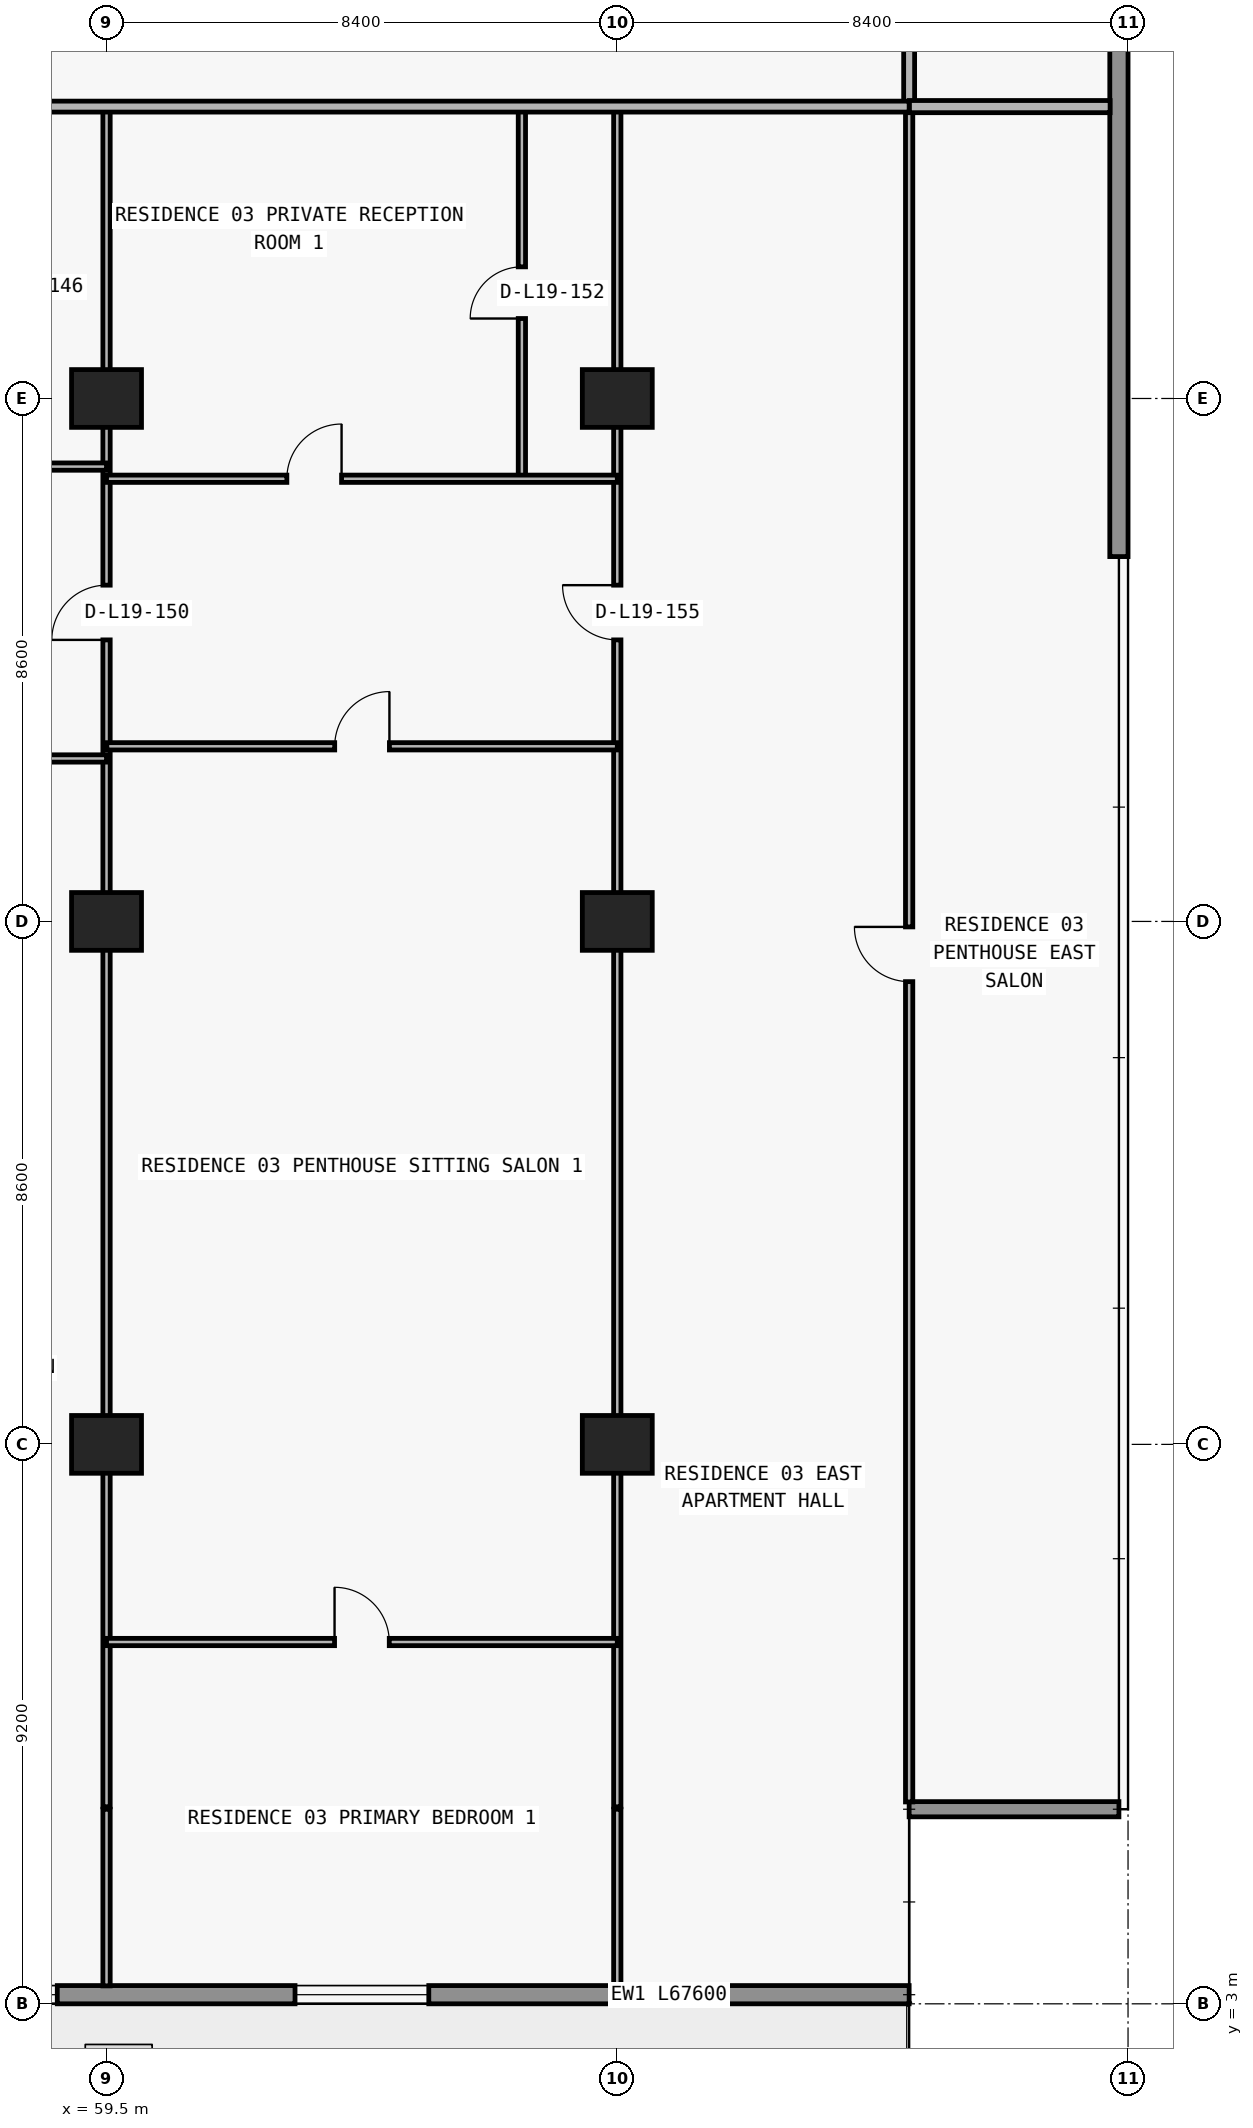
"""IFC4 building model, lengths in metres.
Left out: names, types, materials, properties, quantities, classifications, styles, units other than length and angle.
Written with IfcOpenShell. Run it as: python <this file> out.ifc"""

import sys

from ifc_helpers import new_model, si_unit, direction, frame, frame_2d, origin, origin_2d, place, context, subcontext, project, spatial, rectangle, extrude, element, fill, save


model = new_model("IFC4")
c1 = context("Model", 3, precision=1e-05, world=origin(), true_north=direction((0.0, 1.0)))
c2 = subcontext(c1, "Body", "Model", "MODEL_VIEW")
j1 = project(units=[si_unit("LENGTHUNIT", "METRE"), si_unit("PLANEANGLEUNIT", "RADIAN")], contexts=[c1])
p1 = place(None, origin())
s1 = spatial("IfcSite", under=j1, at=p1, CompositionType="ELEMENT")
p2 = place(p1, origin())
s2 = spatial("IfcBuilding", under=s1, at=p2, CompositionType="ELEMENT")
p3 = place(p2, frame((0.0, 0.0, 72.9)))
s3 = spatial("IfcBuildingStorey", under=s2, at=p3, CompositionType="ELEMENT", Elevation=72.9)
for number, where, z_axis, x_axis in (
    (1, (59.5, 12.2, 0.0), (0.0, 0.0, 1.0), (1.0, 0.0, 0.0)),
    (2, (67.9, 12.2, 0.0), (0.0, 0.0, 1.0), (1.0, 0.0, 0.0)),
    (3, (59.5, 20.8, 0.0), (0.0, 0.0, 1.0), (1.0, 0.0, 0.0)),
    (4, (67.9, 20.8, 0.0), (0.0, 0.0, 1.0), (1.0, 0.0, 0.0)),
    (5, (59.5, 29.4, 0.0), (0.0, 0.0, 1.0), (1.0, 0.0, 0.0)),
    (6, (67.9, 29.4, 0.0), (0.0, 0.0, 1.0), (1.0, 0.0, 0.0)),
):
    element("IfcColumn", number, at=place(p3, frame(where, z_axis=z_axis, x_axis=x_axis)), inside=s3, PredefinedType="COLUMN", context=c2, shape_type="SweptSolid", body=[
        extrude(rectangle(XDim=1.15, YDim=0.95, at=origin_2d()), origin(), (0.0, 0.0, 1.0), 3.05),
    ])
p4 = place(p3, frame((72.7, 3.15, 0.0), z_axis=(0.0, 0.0, 1.0), x_axis=(-1.0, 0.0, 0.0)))
e7 = element("IfcWall", 7, at=p4, inside=s3, PredefinedType="STANDARD", context=c2, shape_type="SweptSolid", body=[
    extrude(rectangle(XDim=67.6, YDim=0.3, at=frame_2d((33.8, 0.0))), origin(), (0.0, 0.0, 1.0), 3.05),
])
p5 = place(p4, frame((59.89, 0.0, 0.0)))
e8 = element("IfcOpeningElement", 8, at=p5, cuts=e7, PredefinedType="OPENING", context=c2, shape_type="SweptSolid", body=[
    extrude(rectangle(XDim=2.0, YDim=2.3, at=frame_2d((1.0, 1.15))), frame((0.0, 0.16, 0.0), z_axis=(0.0, -1.0, 0.0), x_axis=(1.0, 0.0, 0.0)), (0.0, 0.0, 1.0), 0.32),
])
p6 = place(p4, frame((55.21, 0.0, 0.65)))
e9 = element("IfcOpeningElement", 9, at=p6, cuts=e7, PredefinedType="OPENING", context=c2, shape_type="SweptSolid", body=[
    extrude(rectangle(XDim=2.6, YDim=1.85, at=frame_2d((1.3, 0.925))), frame((0.0, 0.16, 0.0), z_axis=(0.0, -1.0, 0.0), x_axis=(1.0, 0.0, 0.0)), (0.0, 0.0, 1.0), 0.32),
])
p7 = place(p4, frame((49.1, 0.0, 0.85)))
e10 = element("IfcOpeningElement", 10, at=p7, cuts=e7, PredefinedType="OPENING", context=c2, shape_type="SweptSolid", body=[
    extrude(rectangle(XDim=2.2, YDim=1.55, at=frame_2d((1.1, 0.775))), frame((0.0, 0.16, 0.0), z_axis=(0.0, -1.0, 0.0), x_axis=(1.0, 0.0, 0.0)), (0.0, 0.0, 1.0), 0.32),
])
p8 = place(p4, frame((43.09, 0.0, 0.0)))
e11 = element("IfcOpeningElement", 11, at=p8, cuts=e7, PredefinedType="OPENING", context=c2, shape_type="SweptSolid", body=[
    extrude(rectangle(XDim=2.0, YDim=2.3, at=frame_2d((1.0, 1.15))), frame((0.0, 0.16, 0.0), z_axis=(0.0, -1.0, 0.0), x_axis=(1.0, 0.0, 0.0)), (0.0, 0.0, 1.0), 0.32),
])
p9 = place(p4, frame((38.41, 0.0, 0.65)))
e12 = element("IfcOpeningElement", 12, at=p9, cuts=e7, PredefinedType="OPENING", context=c2, shape_type="SweptSolid", body=[
    extrude(rectangle(XDim=2.6, YDim=1.85, at=frame_2d((1.3, 0.925))), frame((0.0, 0.16, 0.0), z_axis=(0.0, -1.0, 0.0), x_axis=(1.0, 0.0, 0.0)), (0.0, 0.0, 1.0), 0.32),
])
p10 = place(p4, frame((32.7, 0.0, 0.85)))
e13 = element("IfcOpeningElement", 13, at=p10, cuts=e7, PredefinedType="OPENING", context=c2, shape_type="SweptSolid", body=[
    extrude(rectangle(XDim=2.2, YDim=1.55, at=frame_2d((1.1, 0.775))), frame((0.0, 0.16, 0.0), z_axis=(0.0, -1.0, 0.0), x_axis=(1.0, 0.0, 0.0)), (0.0, 0.0, 1.0), 0.32),
])
p11 = place(p4, frame((24.7, 0.0, 0.85)))
e14 = element("IfcOpeningElement", 14, at=p11, cuts=e7, PredefinedType="OPENING", context=c2, shape_type="SweptSolid", body=[
    extrude(rectangle(XDim=2.2, YDim=1.55, at=frame_2d((1.1, 0.775))), frame((0.0, 0.16, 0.0), z_axis=(0.0, -1.0, 0.0), x_axis=(1.0, 0.0, 0.0)), (0.0, 0.0, 1.0), 0.32),
])
p12 = place(p4, frame((18.69, 0.0, 0.0)))
e15 = element("IfcOpeningElement", 15, at=p12, cuts=e7, PredefinedType="OPENING", context=c2, shape_type="SweptSolid", body=[
    extrude(rectangle(XDim=2.0, YDim=2.3, at=frame_2d((1.0, 1.15))), frame((0.0, 0.16, 0.0), z_axis=(0.0, -1.0, 0.0), x_axis=(1.0, 0.0, 0.0)), (0.0, 0.0, 1.0), 0.32),
])
p13 = place(p4, frame((14.01, 0.0, 0.65)))
e16 = element("IfcOpeningElement", 16, at=p13, cuts=e7, PredefinedType="OPENING", context=c2, shape_type="SweptSolid", body=[
    extrude(rectangle(XDim=2.6, YDim=1.85, at=frame_2d((1.3, 0.925))), frame((0.0, 0.16, 0.0), z_axis=(0.0, -1.0, 0.0), x_axis=(1.0, 0.0, 0.0)), (0.0, 0.0, 1.0), 0.32),
])
p14 = place(p4, frame((7.9, 0.0, 0.85)))
e17 = element("IfcOpeningElement", 17, at=p14, cuts=e7, PredefinedType="OPENING", context=c2, shape_type="SweptSolid", body=[
    extrude(rectangle(XDim=2.2, YDim=1.55, at=frame_2d((1.1, 0.775))), frame((0.0, 0.16, 0.0), z_axis=(0.0, -1.0, 0.0), x_axis=(1.0, 0.0, 0.0)), (0.0, 0.0, 1.0), 0.32),
])
p15 = place(p3, frame((72.7, 6.2, 0.0), z_axis=(0.0, 0.0, 1.0), x_axis=(1.0, 0.0, 0.0)))
e18 = element("IfcWall", 18, at=p15, inside=s3, PredefinedType="ELEMENTEDWALL", context=c2, shape_type="SweptSolid", body=[
    extrude(rectangle(XDim=3.45, YDim=0.25, at=frame_2d((1.725, 0.0))), origin(), (0.0, 0.0, 1.0), 3.05),
])
p16 = place(p3, frame((76.15, 47.4, 0.0), z_axis=(0.0, 0.0, 1.0), x_axis=(0.0, -1.0, 0.0)))
e19 = element("IfcWall", 19, at=p16, inside=s3, PredefinedType="STANDARD", context=c2, shape_type="SweptSolid", body=[
    extrude(rectangle(XDim=20.6, YDim=0.3, at=frame_2d((10.3, 0.0))), origin(), (0.0, 0.0, 1.0), 3.05),
])
p17 = place(p3, frame((59.5, 3.295, 0.0), z_axis=(0.0, 0.0, 1.0), x_axis=(0.0, 1.0, 0.0)))
e20 = element("IfcWall", 20, at=p17, inside=s3, PredefinedType="PARTITIONING", context=c2, shape_type="SweptSolid", body=[
    extrude(rectangle(XDim=2.905, YDim=0.12, at=frame_2d((1.453, 0.0))), origin(), (0.0, 0.0, 1.0), 3.05),
])
p18 = place(p3, frame((59.5, 6.24, 0.0), z_axis=(0.0, 0.0, 1.0), x_axis=(0.0, 1.0, 0.0)))
e21 = element("IfcWall", 21, at=p18, inside=s3, PredefinedType="PARTITIONING", context=c2, shape_type="SweptSolid", body=[
    extrude(rectangle(XDim=27.96, YDim=0.12, at=frame_2d((13.98, 0.0))), origin(), (0.0, 0.0, 1.0), 2.11),
])
p19 = place(p18, frame((19.19, 0.0, 0.0)))
e22 = element("IfcOpeningElement", 22, at=p19, cuts=e21, PredefinedType="OPENING", context=c2, shape_type="SweptSolid", body=[
    extrude(rectangle(XDim=0.9, YDim=2.06, at=frame_2d((0.45, 1.03))), frame((0.0, 0.07, 0.0), z_axis=(0.0, -1.0, 0.0), x_axis=(1.0, 0.0, 0.0)), (0.0, 0.0, 1.0), 0.14),
])
p20 = place(p3, frame((66.331, 28.08, 0.0), z_axis=(0.0, 0.0, 1.0), x_axis=(0.0, 1.0, 0.0)))
e23 = element("IfcWall", 23, at=p20, inside=s3, PredefinedType="PARTITIONING", context=c2, shape_type="SweptSolid", body=[
    extrude(rectangle(XDim=6.12, YDim=0.12, at=frame_2d((3.06, 0.0))), origin(), (0.0, 0.0, 1.0), 3.05),
])
p21 = place(p20, frame((2.635, 0.0, 0.0)))
e24 = element("IfcOpeningElement", 24, at=p21, cuts=e23, PredefinedType="OPENING", context=c2, shape_type="SweptSolid", body=[
    extrude(rectangle(XDim=0.85, YDim=2.1, at=frame_2d((0.425, 1.05))), frame((0.0, 0.07, 0.0), z_axis=(0.0, -1.0, 0.0), x_axis=(1.0, 0.0, 0.0)), (0.0, 0.0, 1.0), 0.14),
])
p22 = place(p3, frame((67.9, 3.295, 0.0), z_axis=(0.0, 0.0, 1.0), x_axis=(0.0, 1.0, 0.0)))
e25 = element("IfcWall", 25, at=p22, inside=s3, PredefinedType="PARTITIONING", context=c2, shape_type="SweptSolid", body=[
    extrude(rectangle(XDim=2.905, YDim=0.12, at=frame_2d((1.453, 0.0))), origin(), (0.0, 0.0, 1.0), 3.05),
])
p23 = place(p3, frame((67.9, 6.24, 0.0), z_axis=(0.0, 0.0, 1.0), x_axis=(0.0, 1.0, 0.0)))
e26 = element("IfcWall", 26, at=p23, inside=s3, PredefinedType="PARTITIONING", context=c2, shape_type="SweptSolid", body=[
    extrude(rectangle(XDim=27.96, YDim=0.12, at=frame_2d((13.98, 0.0))), origin(), (0.0, 0.0, 1.0), 2.11),
])
p24 = place(p23, frame((19.19, 0.0, 0.0)))
e27 = element("IfcOpeningElement", 27, at=p24, cuts=e26, PredefinedType="OPENING", context=c2, shape_type="SweptSolid", body=[
    extrude(rectangle(XDim=0.9, YDim=2.06, at=frame_2d((0.45, 1.03))), frame((0.0, 0.07, 0.0), z_axis=(0.0, -1.0, 0.0), x_axis=(1.0, 0.0, 0.0)), (0.0, 0.0, 1.0), 0.14),
])
p25 = place(p3, frame((72.7, 6.32, 0.0), z_axis=(0.0, 0.0, 1.0), x_axis=(0.0, 1.0, 0.0)))
e28 = element("IfcWall", 28, at=p25, inside=s3, PredefinedType="PARTITIONING", context=c2, shape_type="SweptSolid", body=[
    extrude(rectangle(XDim=27.88, YDim=0.12, at=frame_2d((13.94, 0.0))), origin(), (0.0, 0.0, 1.0), 3.05),
])
p26 = place(p25, frame((13.49, 0.0, 0.0)))
e29 = element("IfcOpeningElement", 29, at=p26, cuts=e28, PredefinedType="OPENING", context=c2, shape_type="SweptSolid", body=[
    extrude(rectangle(XDim=0.9, YDim=2.15, at=frame_2d((0.45, 1.075))), frame((0.0, 0.07, 0.0), z_axis=(0.0, -1.0, 0.0), x_axis=(1.0, 0.0, 0.0)), (0.0, 0.0, 1.0), 0.14),
])
p27 = place(p3, frame((72.7, 34.205, 0.0), z_axis=(0.0, 0.0, 1.0), x_axis=(0.0, 1.0, 0.0)))
e30 = element("IfcWall", 30, at=p27, inside=s3, PredefinedType="PARTITIONING", context=c2, shape_type="SweptSolid", body=[
    extrude(rectangle(XDim=2.695, YDim=0.18, at=frame_2d((1.347, 0.0))), origin(), (0.0, 0.0, 1.0), 3.05),
])
p28 = place(p3, frame((59.5, 8.95, 0.0), z_axis=(0.0, 0.0, 1.0), x_axis=(1.0, 0.0, 0.0)))
e31 = element("IfcWall", 31, at=p28, inside=s3, PredefinedType="PARTITIONING", context=c2, shape_type="SweptSolid", body=[
    extrude(rectangle(XDim=8.4, YDim=0.12, at=frame_2d((4.2, 0.0))), origin(), (0.0, 0.0, 1.0), 3.05),
])
p29 = place(p28, frame((3.75, 0.0, 0.0)))
e32 = element("IfcOpeningElement", 32, at=p29, cuts=e31, PredefinedType="OPENING", context=c2, shape_type="SweptSolid", body=[
    extrude(rectangle(XDim=0.9, YDim=2.15, at=frame_2d((0.45, 1.075))), frame((0.0, 0.07, 0.0), z_axis=(0.0, -1.0, 0.0), x_axis=(1.0, 0.0, 0.0)), (0.0, 0.0, 1.0), 0.14),
])
p30 = place(p3, frame((51.37, 23.48, 0.0), z_axis=(0.0, 0.0, 1.0), x_axis=(1.0, 0.0, 0.0)))
e33 = element("IfcWall", 33, at=p30, inside=s3, PredefinedType="PARTITIONING", context=c2, shape_type="SweptSolid", body=[
    extrude(rectangle(XDim=8.13, YDim=0.12, at=frame_2d((4.065, 0.0))), origin(), (0.0, 0.0, 1.0), 3.05),
])
p31 = place(p30, frame((1.305, 0.0, 0.0)))
e34 = element("IfcOpeningElement", 34, at=p31, cuts=e33, PredefinedType="OPENING", context=c2, shape_type="SweptSolid", body=[
    extrude(rectangle(XDim=0.9, YDim=2.15, at=frame_2d((0.45, 1.075))), frame((0.0, 0.07, 0.0), z_axis=(0.0, -1.0, 0.0), x_axis=(1.0, 0.0, 0.0)), (0.0, 0.0, 1.0), 0.14),
])
p32 = place(p3, frame((59.505, 23.68, 0.0), z_axis=(0.0, 0.0, 1.0), x_axis=(1.0, 0.0, 0.0)))
e35 = element("IfcWall", 35, at=p32, inside=s3, PredefinedType="PARTITIONING", context=c2, shape_type="SweptSolid", body=[
    extrude(rectangle(XDim=8.395, YDim=0.12, at=frame_2d((4.198, 0.0))), origin(), (0.0, 0.0, 1.0), 3.05),
])
p33 = place(p32, frame((3.748, 0.0, 0.0)))
e36 = element("IfcOpeningElement", 36, at=p33, cuts=e35, PredefinedType="OPENING", context=c2, shape_type="SweptSolid", body=[
    extrude(rectangle(XDim=0.9, YDim=2.15, at=frame_2d((0.45, 1.075))), frame((0.0, 0.07, 0.0), z_axis=(0.0, -1.0, 0.0), x_axis=(1.0, 0.0, 0.0)), (0.0, 0.0, 1.0), 0.14),
])
p34 = place(p3, frame((59.5, 28.08, 0.0), z_axis=(0.0, 0.0, 1.0), x_axis=(1.0, 0.0, 0.0)))
e37 = element("IfcWall", 37, at=p34, inside=s3, PredefinedType="PARTITIONING", context=c2, shape_type="SweptSolid", body=[
    extrude(rectangle(XDim=8.4, YDim=0.12, at=frame_2d((4.2, 0.0))), origin(), (0.0, 0.0, 1.0), 3.05),
])
p35 = place(p34, frame((2.966, 0.0, 0.0)))
e38 = element("IfcOpeningElement", 38, at=p35, cuts=e37, PredefinedType="OPENING", context=c2, shape_type="SweptSolid", body=[
    extrude(rectangle(XDim=0.9, YDim=2.15, at=frame_2d((0.45, 1.075))), frame((0.0, 0.07, 0.0), z_axis=(0.0, -1.0, 0.0), x_axis=(1.0, 0.0, 0.0)), (0.0, 0.0, 1.0), 0.14),
])
p36 = place(p3, frame((51.37, 28.28, 0.0), z_axis=(0.0, 0.0, 1.0), x_axis=(1.0, 0.0, 0.0)))
e39 = element("IfcWall", 39, at=p36, inside=s3, PredefinedType="PARTITIONING", context=c2, shape_type="SweptSolid", body=[
    extrude(rectangle(XDim=8.13, YDim=0.12, at=frame_2d((4.065, 0.0))), origin(), (0.0, 0.0, 1.0), 3.05),
])
p37 = place(p36, frame((1.305, 0.0, 0.0)))
e40 = element("IfcOpeningElement", 40, at=p37, cuts=e39, PredefinedType="OPENING", context=c2, shape_type="SweptSolid", body=[
    extrude(rectangle(XDim=0.9, YDim=2.15, at=frame_2d((0.45, 1.075))), frame((0.0, 0.07, 0.0), z_axis=(0.0, -1.0, 0.0), x_axis=(1.0, 0.0, 0.0)), (0.0, 0.0, 1.0), 0.14),
])
p38 = place(p3, frame((5.105, 34.2, 0.0), z_axis=(0.0, 0.0, 1.0), x_axis=(1.0, 0.0, 0.0)))
e41 = element("IfcWall", 41, at=p38, inside=s3, PredefinedType="PARTITIONING", context=c2, shape_type="SweptSolid", body=[
    extrude(rectangle(XDim=67.595, YDim=0.18, at=frame_2d((33.797, 0.0))), origin(), (0.0, 0.0, 1.0), 3.05),
])
p39 = place(p38, frame((7.639, 0.0, 0.0)))
e42 = element("IfcOpeningElement", 42, at=p39, cuts=e41, PredefinedType="OPENING", context=c2, shape_type="SweptSolid", body=[
    extrude(rectangle(XDim=1.0, YDim=2.2, at=frame_2d((0.5, 1.1))), frame((0.0, 0.1, 0.0), z_axis=(0.0, -1.0, 0.0), x_axis=(1.0, 0.0, 0.0)), (0.0, 0.0, 1.0), 0.2),
])
p40 = place(p38, frame((24.423, 0.0, 0.0)))
e43 = element("IfcOpeningElement", 43, at=p40, cuts=e41, PredefinedType="OPENING", context=c2, shape_type="SweptSolid", body=[
    extrude(rectangle(XDim=1.0, YDim=2.2, at=frame_2d((0.5, 1.1))), frame((0.0, 0.1, 0.0), z_axis=(0.0, -1.0, 0.0), x_axis=(1.0, 0.0, 0.0)), (0.0, 0.0, 1.0), 0.2),
])
p41 = place(p38, frame((48.825, 0.0, 0.0)))
e44 = element("IfcOpeningElement", 44, at=p41, cuts=e41, PredefinedType="OPENING", context=c2, shape_type="SweptSolid", body=[
    extrude(rectangle(XDim=1.0, YDim=2.2, at=frame_2d((0.5, 1.1))), frame((0.0, 0.1, 0.0), z_axis=(0.0, -1.0, 0.0), x_axis=(1.0, 0.0, 0.0)), (0.0, 0.0, 1.0), 0.2),
])
p42 = place(p3, frame((72.705, 34.2, 0.0), z_axis=(0.0, 0.0, 1.0), x_axis=(1.0, 0.0, 0.0)))
e45 = element("IfcWall", 45, at=p42, inside=s3, PredefinedType="PARTITIONING", context=c2, shape_type="SweptSolid", body=[
    extrude(rectangle(XDim=3.3, YDim=0.2, at=frame_2d((1.65, 0.0))), origin(), (0.0, 0.0, 1.0), 3.05),
])
p43 = place(p13, origin())
e46 = element("IfcWindow", 46, at=p43, inside=s3, PartitioningType="SINGLE_PANEL", PredefinedType="WINDOW", context=c2, shape_type="SweptSolid", body=[
    extrude(rectangle(XDim=2.6, YDim=1.85, at=frame_2d((1.3, 0.925))), frame((0.0, 0.03, 0.0), z_axis=(0.0, -1.0, 0.0), x_axis=(1.0, 0.0, 0.0)), (0.0, 0.0, 1.0), 0.06),
])
fill(e16, e46)
p44 = place(p14, origin())
e47 = element("IfcWindow", 47, at=p44, inside=s3, PartitioningType="SINGLE_PANEL", PredefinedType="WINDOW", context=c2, shape_type="SweptSolid", body=[
    extrude(rectangle(XDim=2.2, YDim=1.55, at=frame_2d((1.1, 0.775))), frame((0.0, 0.03, 0.0), z_axis=(0.0, -1.0, 0.0), x_axis=(1.0, 0.0, 0.0)), (0.0, 0.0, 1.0), 0.06),
])
fill(e17, e47)
p45 = place(p19, origin())
e48 = element("IfcDoor", 48, at=p45, inside=s3, OperationType="SINGLE_SWING_LEFT", PredefinedType="DOOR", context=c2, shape_type="SweptSolid", body=[
    extrude(rectangle(XDim=0.9, YDim=2.06, at=frame_2d((0.45, 1.03))), frame((0.0, 0.025, 0.0), z_axis=(0.0, -1.0, 0.0), x_axis=(1.0, 0.0, 0.0)), (0.0, 0.0, 1.0), 0.05),
])
fill(e22, e48)
p46 = place(p35, origin())
e49 = element("IfcDoor", 49, at=p46, inside=s3, OperationType="SINGLE_SWING_RIGHT", PredefinedType="DOOR", context=c2, shape_type="SweptSolid", body=[
    extrude(rectangle(XDim=0.9, YDim=2.15, at=frame_2d((0.45, 1.075))), frame((0.0, 0.025, 0.0), z_axis=(0.0, -1.0, 0.0), x_axis=(1.0, 0.0, 0.0)), (0.0, 0.0, 1.0), 0.05),
])
fill(e38, e49)
p47 = place(p21, origin())
e50 = element("IfcDoor", 50, at=p47, inside=s3, OperationType="SINGLE_SWING_LEFT", PredefinedType="DOOR", context=c2, shape_type="SweptSolid", body=[
    extrude(rectangle(XDim=0.85, YDim=2.1, at=frame_2d((0.425, 1.05))), frame((0.0, 0.025, 0.0), z_axis=(0.0, -1.0, 0.0), x_axis=(1.0, 0.0, 0.0)), (0.0, 0.0, 1.0), 0.05),
])
fill(e24, e50)
p48 = place(p33, origin())
e51 = element("IfcDoor", 51, at=p48, inside=s3, OperationType="SINGLE_SWING_RIGHT", PredefinedType="DOOR", context=c2, shape_type="SweptSolid", body=[
    extrude(rectangle(XDim=0.9, YDim=2.15, at=frame_2d((0.45, 1.075))), frame((0.0, 0.025, 0.0), z_axis=(0.0, -1.0, 0.0), x_axis=(1.0, 0.0, 0.0)), (0.0, 0.0, 1.0), 0.05),
])
fill(e36, e51)
p49 = place(p29, origin())
e52 = element("IfcDoor", 52, at=p49, inside=s3, OperationType="SINGLE_SWING_LEFT", PredefinedType="DOOR", context=c2, shape_type="SweptSolid", body=[
    extrude(rectangle(XDim=0.9, YDim=2.15, at=frame_2d((0.45, 1.075))), frame((0.0, 0.025, 0.0), z_axis=(0.0, -1.0, 0.0), x_axis=(1.0, 0.0, 0.0)), (0.0, 0.0, 1.0), 0.05),
])
fill(e32, e52)
p50 = place(p24, origin())
e53 = element("IfcDoor", 53, at=p50, inside=s3, OperationType="SINGLE_SWING_RIGHT", PredefinedType="DOOR", context=c2, shape_type="SweptSolid", body=[
    extrude(rectangle(XDim=0.9, YDim=2.06, at=frame_2d((0.45, 1.03))), frame((0.0, 0.025, 0.0), z_axis=(0.0, -1.0, 0.0), x_axis=(1.0, 0.0, 0.0)), (0.0, 0.0, 1.0), 0.05),
])
fill(e27, e53)
p51 = place(p26, origin())
e54 = element("IfcDoor", 54, at=p51, inside=s3, OperationType="SINGLE_SWING_RIGHT", PredefinedType="DOOR", context=c2, shape_type="SweptSolid", body=[
    extrude(rectangle(XDim=0.9, YDim=2.15, at=frame_2d((0.45, 1.075))), frame((0.0, 0.025, 0.0), z_axis=(0.0, -1.0, 0.0), x_axis=(1.0, 0.0, 0.0)), (0.0, 0.0, 1.0), 0.05),
])
fill(e29, e54)
save(model, sys.argv[1])
